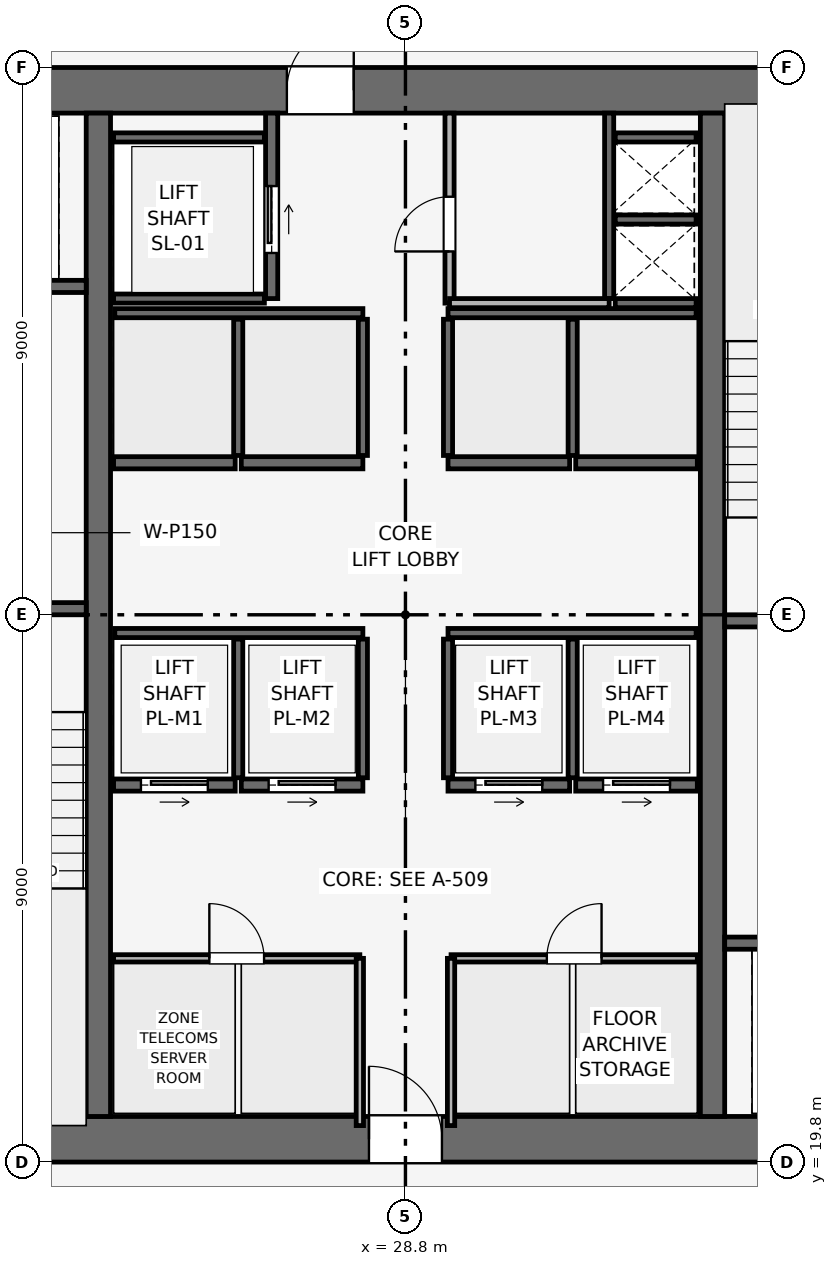
"""IFC4 building model, lengths in metres.
Left out: names, types, materials, properties, quantities, classifications, styles, units other than length and angle.
Written with IfcOpenShell. Run it as: python <this file> out.ifc"""

import sys

from ifc_helpers import new_model, si_unit, direction, frame, frame_2d, origin, place, context, subcontext, project, spatial, rectangle, extrude, element, fill, save


model = new_model("IFC4")
c1 = context("Model", 3, precision=1e-05, world=origin(), true_north=direction((0.0, 1.0)))
c2 = subcontext(c1, "Body", "Model", "MODEL_VIEW")
j1 = project(units=[si_unit("LENGTHUNIT", "METRE"), si_unit("PLANEANGLEUNIT", "RADIAN")], contexts=[c1])
p1 = place(None, origin())
s1 = spatial("IfcSite", under=j1, at=p1, CompositionType="ELEMENT")
p2 = place(p1, origin())
s2 = spatial("IfcBuilding", under=s1, at=p2, CompositionType="ELEMENT")
p3 = place(p2, frame((0.0, 0.0, 214.95)))
s3 = spatial("IfcBuildingStorey", under=s2, at=p3, CompositionType="ELEMENT", Elevation=214.95)
p4 = place(p3, frame((19.8, 20.175, 0.0), z_axis=(0.0, 0.0, 1.0), x_axis=(1.0, 0.0, 0.0)))
e1 = element("IfcWall", 1, at=p4, inside=s3, PredefinedType="SHEAR", context=c2, shape_type="SweptSolid", body=[
    extrude(rectangle(XDim=18.0, YDim=0.75, at=frame_2d((9.0, 0.0))), origin(), (0.0, 0.0, 1.0), 3.75),
])
p5 = place(p4, frame((8.4, 0.0, 0.0)))
e2 = element("IfcOpeningElement", 2, at=p5, cuts=e1, PredefinedType="OPENING", context=c2, shape_type="SweptSolid", body=[
    extrude(rectangle(XDim=1.2, YDim=2.2, at=frame_2d((0.6, 1.1))), frame((0.0, 0.385, 0.0), z_axis=(0.0, -1.0, 0.0), x_axis=(1.0, 0.0, 0.0)), (0.0, 0.0, 1.0), 0.77),
])
p6 = place(p3, frame((19.8, 37.425, 0.0), z_axis=(0.0, 0.0, 1.0), x_axis=(1.0, 0.0, 0.0)))
e3 = element("IfcWall", 3, at=p6, inside=s3, PredefinedType="SHEAR", context=c2, shape_type="SweptSolid", body=[
    extrude(rectangle(XDim=18.0, YDim=0.75, at=frame_2d((9.0, 0.0))), origin(), (0.0, 0.0, 1.0), 3.75),
])
p7 = place(p6, frame((7.05, 0.0, 0.0)))
e4 = element("IfcOpeningElement", 4, at=p7, cuts=e3, PredefinedType="OPENING", context=c2, shape_type="SweptSolid", body=[
    extrude(rectangle(XDim=1.1, YDim=2.15, at=frame_2d((0.55, 1.075))), frame((0.0, 0.385, 0.0), z_axis=(0.0, -1.0, 0.0), x_axis=(1.0, 0.0, 0.0)), (0.0, 0.0, 1.0), 0.77),
])
for number, where, z_axis, x_axis in (
    (5, (23.75, 20.55, 0.0), (0.0, 0.0, 1.0), (0.0, 1.0, 0.0)),
    (6, (33.85, 20.55, 0.0), (0.0, 0.0, 1.0), (0.0, 1.0, 0.0)),
):
    element("IfcWall", number, at=place(p3, frame(where, z_axis=z_axis, x_axis=x_axis)), inside=s3, PredefinedType="SHEAR", context=c2, shape_type="SweptSolid", body=[
        extrude(rectangle(XDim=16.5, YDim=0.4, at=frame_2d((8.25, 0.0))), origin(), (0.0, 0.0, 1.0), 3.75),
    ])
p8 = place(p3, frame((20.4, 28.9, 0.0), z_axis=(0.0, 0.0, 1.0), x_axis=(1.0, 0.0, 0.0)))
e7 = element("IfcWall", 7, at=p8, inside=s3, PredefinedType="SHEAR", context=c2, shape_type="SweptSolid", body=[
    extrude(rectangle(XDim=3.15, YDim=0.2, at=frame_2d((1.575, 0.0))), origin(), (0.0, 0.0, 1.0), 3.5),
])
p9 = place(p8, frame((0.8, 0.0, 0.0)))
e8 = element("IfcOpeningElement", 8, at=p9, cuts=e7, PredefinedType="OPENING", context=c2, shape_type="SweptSolid", body=[
    extrude(rectangle(XDim=1.0, YDim=2.1, at=frame_2d((0.5, 1.05))), frame((0.0, 0.11, 0.0), z_axis=(0.0, -1.0, 0.0), x_axis=(1.0, 0.0, 0.0)), (0.0, 0.0, 1.0), 0.22),
])
p10 = place(p3, frame((34.05, 28.7, 0.0), z_axis=(0.0, 0.0, 1.0), x_axis=(1.0, 0.0, 0.0)))
e9 = element("IfcWall", 9, at=p10, inside=s3, PredefinedType="SHEAR", context=c2, shape_type="SweptSolid", body=[
    extrude(rectangle(XDim=3.15, YDim=0.2, at=frame_2d((1.575, 0.0))), origin(), (0.0, 0.0, 1.0), 3.5),
])
p11 = place(p10, frame((0.8, 0.0, 0.0)))
e10 = element("IfcOpeningElement", 10, at=p11, cuts=e9, PredefinedType="OPENING", context=c2, shape_type="SweptSolid", body=[
    extrude(rectangle(XDim=1.0, YDim=2.1, at=frame_2d((0.5, 1.05))), frame((0.0, 0.11, 0.0), z_axis=(0.0, -1.0, 0.0), x_axis=(1.0, 0.0, 0.0)), (0.0, 0.0, 1.0), 0.22),
])
p12 = place(p3, frame((32.15, 34.0, 0.0), z_axis=(0.0, 0.0, 1.0), x_axis=(0.0, 1.0, 0.0)))
e11 = element("IfcWall", 11, at=p12, inside=s3, PredefinedType="SHEAR", context=c2, shape_type="SweptSolid", body=[
    extrude(rectangle(XDim=3.05, YDim=0.15, at=frame_2d((1.525, 0.0))), origin(), (0.0, 0.0, 1.0), 3.5),
])
for number, where, z_axis, x_axis in (
    (12, (32.25, 33.925, 0.0), (0.0, 0.0, 1.0), (1.0, 0.0, 0.0)),
    (13, (32.25, 35.3, 0.0), (0.0, 0.0, 1.0), (1.0, 0.0, 0.0)),
):
    element("IfcWall", number, at=place(p3, frame(where, z_axis=z_axis, x_axis=x_axis)), inside=s3, PredefinedType="SHEAR", context=c2, shape_type="SweptSolid", body=[
        extrude(rectangle(XDim=1.33, YDim=0.15, at=frame_2d((0.665, 0.0))), origin(), (0.0, 0.0, 1.0), 3.5),
    ])
p13 = place(p3, frame((20.5, 34.2, 0.0), z_axis=(0.0, 0.0, 1.0), x_axis=(1.0, 0.0, 0.0)))
e14 = element("IfcWall", 14, at=p13, inside=s3, PredefinedType="SHEAR", context=c2, shape_type="SweptSolid", body=[
    extrude(rectangle(XDim=3.05, YDim=0.2, at=frame_2d((1.525, 0.0))), origin(), (0.0, 0.0, 1.0), 3.5),
])
p14 = place(p13, frame((0.75, 0.0, 0.0)))
e15 = element("IfcOpeningElement", 15, at=p14, cuts=e14, PredefinedType="OPENING", context=c2, shape_type="SweptSolid", body=[
    extrude(rectangle(XDim=1.1, YDim=2.15, at=frame_2d((0.55, 1.075))), frame((0.0, 0.11, 0.0), z_axis=(0.0, -1.0, 0.0), x_axis=(1.0, 0.0, 0.0)), (0.0, 0.0, 1.0), 0.22),
])
p15 = place(p3, frame((34.05, 23.4, 0.0), z_axis=(0.0, 0.0, 1.0), x_axis=(1.0, 0.0, 0.0)))
e16 = element("IfcWall", 16, at=p15, inside=s3, PredefinedType="SHEAR", context=c2, shape_type="SweptSolid", body=[
    extrude(rectangle(XDim=3.05, YDim=0.2, at=frame_2d((1.525, 0.0))), origin(), (0.0, 0.0, 1.0), 3.5),
])
p16 = place(p15, frame((1.2, 0.0, 0.0)))
e17 = element("IfcOpeningElement", 17, at=p16, cuts=e16, PredefinedType="OPENING", context=c2, shape_type="SweptSolid", body=[
    extrude(rectangle(XDim=1.1, YDim=2.15, at=frame_2d((0.55, 1.075))), frame((0.0, 0.11, 0.0), z_axis=(0.0, -1.0, 0.0), x_axis=(1.0, 0.0, 0.0)), (0.0, 0.0, 1.0), 0.22),
])
p17 = place(p3, frame((26.6, 34.0, 0.0), z_axis=(0.0, 0.0, 1.0), x_axis=(0.0, 1.0, 0.0)))
e18 = element("IfcWall", 18, at=p17, inside=s3, PredefinedType="SHEAR", context=c2, shape_type="SweptSolid", body=[
    extrude(rectangle(XDim=3.05, YDim=0.2, at=frame_2d((1.525, 0.0))), origin(), (0.0, 0.0, 1.0), 3.5),
])
p18 = place(p17, frame((0.75, 0.0, 0.0)))
e19 = element("IfcOpeningElement", 19, at=p18, cuts=e18, PredefinedType="OPENING", context=c2, shape_type="SweptSolid", body=[
    extrude(rectangle(XDim=1.1, YDim=2.15, at=frame_2d((0.55, 1.075))), frame((0.0, 0.11, 0.0), z_axis=(0.0, -1.0, 0.0), x_axis=(1.0, 0.0, 0.0)), (0.0, 0.0, 1.0), 0.22),
])
for number, where, z_axis, x_axis in (
    (20, (24.0, 34.0, 0.0), (0.0, 0.0, 1.0), (1.0, 0.0, 0.0)),
    (21, (24.0, 36.65, 0.0), (0.0, 0.0, 1.0), (1.0, 0.0, 0.0)),
):
    element("IfcWall", number, at=place(p3, frame(where, z_axis=z_axis, x_axis=x_axis)), inside=s3, PredefinedType="SHEAR", context=c2, shape_type="SweptSolid", body=[
        extrude(rectangle(XDim=2.48, YDim=0.15, at=frame_2d((1.24, 0.0))), origin(), (0.0, 0.0, 1.0), 3.5),
    ])
p19 = place(p3, frame((24.0, 26.0, 0.0), z_axis=(0.0, 0.0, 1.0), x_axis=(1.0, 0.0, 0.0)))
e22 = element("IfcWall", 22, at=p19, inside=s3, PredefinedType="SHEAR", context=c2, shape_type="SweptSolid", body=[
    extrude(rectangle(XDim=2.0, YDim=0.2, at=frame_2d((1.0, 0.0))), origin(), (0.0, 0.0, 1.0), 3.5),
])
p20 = place(p19, frame((0.45, 0.0, 0.0)))
e23 = element("IfcOpeningElement", 23, at=p20, cuts=e22, PredefinedType="OPENING", context=c2, shape_type="SweptSolid", body=[
    extrude(rectangle(XDim=1.1, YDim=2.15, at=frame_2d((0.55, 1.075))), frame((0.0, 0.11, 0.0), z_axis=(0.0, -1.0, 0.0), x_axis=(1.0, 0.0, 0.0)), (0.0, 0.0, 1.0), 0.22),
])
p21 = place(p3, frame((26.1, 26.0, 0.0), z_axis=(0.0, 0.0, 1.0), x_axis=(1.0, 0.0, 0.0)))
e24 = element("IfcWall", 24, at=p21, inside=s3, PredefinedType="SHEAR", context=c2, shape_type="SweptSolid", body=[
    extrude(rectangle(XDim=2.0, YDim=0.2, at=frame_2d((1.0, 0.0))), origin(), (0.0, 0.0, 1.0), 3.5),
])
p22 = place(p21, frame((0.45, 0.0, 0.0)))
e25 = element("IfcOpeningElement", 25, at=p22, cuts=e24, PredefinedType="OPENING", context=c2, shape_type="SweptSolid", body=[
    extrude(rectangle(XDim=1.1, YDim=2.15, at=frame_2d((0.55, 1.075))), frame((0.0, 0.11, 0.0), z_axis=(0.0, -1.0, 0.0), x_axis=(1.0, 0.0, 0.0)), (0.0, 0.0, 1.0), 0.22),
])
p23 = place(p3, frame((29.5, 26.0, 0.0), z_axis=(0.0, 0.0, 1.0), x_axis=(1.0, 0.0, 0.0)))
e26 = element("IfcWall", 26, at=p23, inside=s3, PredefinedType="SHEAR", context=c2, shape_type="SweptSolid", body=[
    extrude(rectangle(XDim=2.0, YDim=0.2, at=frame_2d((1.0, 0.0))), origin(), (0.0, 0.0, 1.0), 3.5),
])
p24 = place(p23, frame((0.45, 0.0, 0.0)))
e27 = element("IfcOpeningElement", 27, at=p24, cuts=e26, PredefinedType="OPENING", context=c2, shape_type="SweptSolid", body=[
    extrude(rectangle(XDim=1.1, YDim=2.15, at=frame_2d((0.55, 1.075))), frame((0.0, 0.11, 0.0), z_axis=(0.0, -1.0, 0.0), x_axis=(1.0, 0.0, 0.0)), (0.0, 0.0, 1.0), 0.22),
])
p25 = place(p3, frame((31.6, 26.0, 0.0), z_axis=(0.0, 0.0, 1.0), x_axis=(1.0, 0.0, 0.0)))
e28 = element("IfcWall", 28, at=p25, inside=s3, PredefinedType="SHEAR", context=c2, shape_type="SweptSolid", body=[
    extrude(rectangle(XDim=2.0, YDim=0.2, at=frame_2d((1.0, 0.0))), origin(), (0.0, 0.0, 1.0), 3.5),
])
p26 = place(p25, frame((0.45, 0.0, 0.0)))
e29 = element("IfcOpeningElement", 29, at=p26, cuts=e28, PredefinedType="OPENING", context=c2, shape_type="SweptSolid", body=[
    extrude(rectangle(XDim=1.1, YDim=2.15, at=frame_2d((0.55, 1.075))), frame((0.0, 0.11, 0.0), z_axis=(0.0, -1.0, 0.0), x_axis=(1.0, 0.0, 0.0)), (0.0, 0.0, 1.0), 0.22),
])
for number, where, z_axis, x_axis in (
    (30, (24.0, 31.3, 0.0), (0.0, 0.0, 1.0), (1.0, 0.0, 0.0)),
    (31, (26.1, 31.3, 0.0), (0.0, 0.0, 1.0), (1.0, 0.0, 0.0)),
    (32, (29.5, 31.3, 0.0), (0.0, 0.0, 1.0), (1.0, 0.0, 0.0)),
    (33, (31.6, 31.3, 0.0), (0.0, 0.0, 1.0), (1.0, 0.0, 0.0)),
):
    element("IfcWall", number, at=place(p3, frame(where, z_axis=z_axis, x_axis=x_axis)), inside=s3, PredefinedType="SHEAR", context=c2, shape_type="SweptSolid", body=[
        extrude(rectangle(XDim=2.0, YDim=0.2, at=frame_2d((1.0, 0.0))), origin(), (0.0, 0.0, 1.0), 3.5),
    ])
p27 = place(p3, frame((32.25, 36.65, 0.0), z_axis=(0.0, 0.0, 1.0), x_axis=(1.0, 0.0, 0.0)))
e34 = element("IfcWall", 34, at=p27, inside=s3, PredefinedType="SHEAR", context=c2, shape_type="SweptSolid", body=[
    extrude(rectangle(XDim=1.33, YDim=0.15, at=frame_2d((0.665, 0.0))), origin(), (0.0, 0.0, 1.0), 3.5),
])
for number, where, z_axis, x_axis in (
    (35, (24.02, 28.5, 0.0), (0.0, 0.0, 1.0), (1.0, 0.0, 0.0)),
    (36, (29.5, 28.5, 0.0), (0.0, 0.0, 1.0), (1.0, 0.0, 0.0)),
):
    element("IfcWall", number, at=place(p3, frame(where, z_axis=z_axis, x_axis=x_axis)), inside=s3, PredefinedType="SHEAR", context=c2, shape_type="SweptSolid", body=[
        extrude(rectangle(XDim=4.08, YDim=0.15, at=frame_2d((2.04, 0.0))), origin(), (0.0, 0.0, 1.0), 3.5),
    ])
for number, where, z_axis, x_axis in (
    (37, (26.05, 26.12, 0.0), (0.0, 0.0, 1.0), (0.0, 1.0, 0.0)),
    (38, (28.1, 26.12, 0.0), (0.0, 0.0, 1.0), (0.0, 1.0, 0.0)),
    (39, (29.5, 26.12, 0.0), (0.0, 0.0, 1.0), (0.0, 1.0, 0.0)),
    (40, (31.55, 26.12, 0.0), (0.0, 0.0, 1.0), (0.0, 1.0, 0.0)),
):
    element("IfcWall", number, at=place(p3, frame(where, z_axis=z_axis, x_axis=x_axis)), inside=s3, PredefinedType="SHEAR", context=c2, shape_type="SweptSolid", body=[
        extrude(rectangle(XDim=2.28, YDim=0.15, at=frame_2d((1.14, 0.0))), origin(), (0.0, 0.0, 1.0), 3.5),
    ])
for number, where, z_axis, x_axis in (
    (41, (24.02, 33.76, 0.0), (0.0, 0.0, 1.0), (1.0, 0.0, 0.0)),
    (42, (29.5, 33.76, 0.0), (0.0, 0.0, 1.0), (1.0, 0.0, 0.0)),
):
    element("IfcWall", number, at=place(p3, frame(where, z_axis=z_axis, x_axis=x_axis)), inside=s3, PredefinedType="SHEAR", context=c2, shape_type="SweptSolid", body=[
        extrude(rectangle(XDim=4.08, YDim=0.15, at=frame_2d((2.04, 0.0))), origin(), (0.0, 0.0, 1.0), 3.5),
    ])
for number, where, z_axis, x_axis in (
    (43, (26.05, 31.42, 0.0), (0.0, 0.0, 1.0), (0.0, 1.0, 0.0)),
    (44, (28.1, 31.42, 0.0), (0.0, 0.0, 1.0), (0.0, 1.0, 0.0)),
    (45, (29.5, 31.42, 0.0), (0.0, 0.0, 1.0), (0.0, 1.0, 0.0)),
    (46, (31.55, 31.42, 0.0), (0.0, 0.0, 1.0), (0.0, 1.0, 0.0)),
):
    element("IfcWall", number, at=place(p3, frame(where, z_axis=z_axis, x_axis=x_axis)), inside=s3, PredefinedType="SHEAR", context=c2, shape_type="SweptSolid", body=[
        extrude(rectangle(XDim=2.24, YDim=0.15, at=frame_2d((1.12, 0.0))), origin(), (0.0, 0.0, 1.0), 3.5),
    ])
p28 = place(p3, frame((29.525, 33.925, 0.0), z_axis=(0.0, 0.0, 1.0), x_axis=(0.0, 1.0, 0.0)))
e47 = element("IfcWall", 47, at=p28, inside=s3, PredefinedType="PARTITIONING", context=c2, shape_type="SweptSolid", body=[
    extrude(rectangle(XDim=3.125, YDim=0.15, at=frame_2d((1.562, 0.0))), origin(), (0.0, 0.0, 1.0), 3.5),
])
p29 = place(p28, frame((0.85, 0.0, 0.0)))
e48 = element("IfcOpeningElement", 48, at=p29, cuts=e47, PredefinedType="OPENING", context=c2, shape_type="SweptSolid", body=[
    extrude(rectangle(XDim=0.9, YDim=2.1, at=frame_2d((0.45, 1.05))), frame((0.0, 0.085, 0.0), z_axis=(0.0, -1.0, 0.0), x_axis=(1.0, 0.0, 0.0)), (0.0, 0.0, 1.0), 0.17),
])
p30 = place(p3, frame((29.525, 33.925, 0.0), z_axis=(0.0, 0.0, 1.0), x_axis=(1.0, 0.0, 0.0)))
e49 = element("IfcWall", 49, at=p30, inside=s3, PredefinedType="PARTITIONING", context=c2, shape_type="SweptSolid", body=[
    extrude(rectangle(XDim=2.625, YDim=0.15, at=frame_2d((1.312, 0.0))), origin(), (0.0, 0.0, 1.0), 3.5),
])
p31 = place(p3, frame((24.0, 23.15, 0.0), z_axis=(0.0, 0.0, 1.0), x_axis=(1.0, 0.0, 0.0)))
e50 = element("IfcWall", 50, at=p31, inside=s3, PredefinedType="PARTITIONING", context=c2, shape_type="SweptSolid", body=[
    extrude(rectangle(XDim=4.05, YDim=0.12, at=frame_2d((2.025, 0.0))), origin(), (0.0, 0.0, 1.0), 3.5),
])
p32 = place(p31, frame((1.575, 0.0, 0.0)))
e51 = element("IfcOpeningElement", 51, at=p32, cuts=e50, PredefinedType="OPENING", context=c2, shape_type="SweptSolid", body=[
    extrude(rectangle(XDim=0.9, YDim=2.1, at=frame_2d((0.45, 1.05))), frame((0.0, 0.07, 0.0), z_axis=(0.0, -1.0, 0.0), x_axis=(1.0, 0.0, 0.0)), (0.0, 0.0, 1.0), 0.14),
])
p33 = place(p3, frame((28.05, 20.4, 0.0), z_axis=(0.0, 0.0, 1.0), x_axis=(0.0, 1.0, 0.0)))
e52 = element("IfcWall", 52, at=p33, inside=s3, PredefinedType="PARTITIONING", context=c2, shape_type="SweptSolid", body=[
    extrude(rectangle(XDim=2.75, YDim=0.12, at=frame_2d((1.375, 0.0))), origin(), (0.0, 0.0, 1.0), 3.5),
])
p34 = place(p3, frame((29.55, 23.15, 0.0), z_axis=(0.0, 0.0, 1.0), x_axis=(1.0, 0.0, 0.0)))
e53 = element("IfcWall", 53, at=p34, inside=s3, PredefinedType="PARTITIONING", context=c2, shape_type="SweptSolid", body=[
    extrude(rectangle(XDim=4.05, YDim=0.12, at=frame_2d((2.025, 0.0))), origin(), (0.0, 0.0, 1.0), 3.5),
])
p35 = place(p34, frame((1.575, 0.0, 0.0)))
e54 = element("IfcOpeningElement", 54, at=p35, cuts=e53, PredefinedType="OPENING", context=c2, shape_type="SweptSolid", body=[
    extrude(rectangle(XDim=0.9, YDim=2.1, at=frame_2d((0.45, 1.05))), frame((0.0, 0.07, 0.0), z_axis=(0.0, -1.0, 0.0), x_axis=(1.0, 0.0, 0.0)), (0.0, 0.0, 1.0), 0.14),
])
p36 = place(p3, frame((29.55, 20.4, 0.0), z_axis=(0.0, 0.0, 1.0), x_axis=(0.0, 1.0, 0.0)))
e55 = element("IfcWall", 55, at=p36, inside=s3, PredefinedType="PARTITIONING", context=c2, shape_type="SweptSolid", body=[
    extrude(rectangle(XDim=2.75, YDim=0.12, at=frame_2d((1.375, 0.0))), origin(), (0.0, 0.0, 1.0), 3.5),
])
p37 = place(p18, origin())
e56 = element("IfcDoor", 56, at=p37, inside=s3, OperationType="SLIDING_TO_RIGHT", PredefinedType="DOOR", context=c2, shape_type="SweptSolid", body=[
    extrude(rectangle(XDim=1.1, YDim=2.15, at=frame_2d((0.55, 1.075))), frame((0.0, 0.025, 0.0), z_axis=(0.0, -1.0, 0.0), x_axis=(1.0, 0.0, 0.0)), (0.0, 0.0, 1.0), 0.05),
])
fill(e19, e56)
p38 = place(p20, origin())
e57 = element("IfcDoor", 57, at=p38, inside=s3, OperationType="SLIDING_TO_RIGHT", PredefinedType="DOOR", context=c2, shape_type="SweptSolid", body=[
    extrude(rectangle(XDim=1.1, YDim=2.15, at=frame_2d((0.55, 1.075))), frame((0.0, 0.025, 0.0), z_axis=(0.0, -1.0, 0.0), x_axis=(1.0, 0.0, 0.0)), (0.0, 0.0, 1.0), 0.05),
])
fill(e23, e57)
p39 = place(p22, origin())
e58 = element("IfcDoor", 58, at=p39, inside=s3, OperationType="SLIDING_TO_RIGHT", PredefinedType="DOOR", context=c2, shape_type="SweptSolid", body=[
    extrude(rectangle(XDim=1.1, YDim=2.15, at=frame_2d((0.55, 1.075))), frame((0.0, 0.025, 0.0), z_axis=(0.0, -1.0, 0.0), x_axis=(1.0, 0.0, 0.0)), (0.0, 0.0, 1.0), 0.05),
])
fill(e25, e58)
p40 = place(p24, origin())
e59 = element("IfcDoor", 59, at=p40, inside=s3, OperationType="SLIDING_TO_RIGHT", PredefinedType="DOOR", context=c2, shape_type="SweptSolid", body=[
    extrude(rectangle(XDim=1.1, YDim=2.15, at=frame_2d((0.55, 1.075))), frame((0.0, 0.025, 0.0), z_axis=(0.0, -1.0, 0.0), x_axis=(1.0, 0.0, 0.0)), (0.0, 0.0, 1.0), 0.05),
])
fill(e27, e59)
p41 = place(p26, origin())
e60 = element("IfcDoor", 60, at=p41, inside=s3, OperationType="SLIDING_TO_RIGHT", PredefinedType="DOOR", context=c2, shape_type="SweptSolid", body=[
    extrude(rectangle(XDim=1.1, YDim=2.15, at=frame_2d((0.55, 1.075))), frame((0.0, 0.025, 0.0), z_axis=(0.0, -1.0, 0.0), x_axis=(1.0, 0.0, 0.0)), (0.0, 0.0, 1.0), 0.05),
])
fill(e29, e60)
p42 = place(p29, origin())
e61 = element("IfcDoor", 61, at=p42, inside=s3, OperationType="SINGLE_SWING_LEFT", PredefinedType="DOOR", context=c2, shape_type="SweptSolid", body=[
    extrude(rectangle(XDim=0.9, YDim=2.1, at=frame_2d((0.45, 1.05))), frame((0.0, 0.025, 0.0), z_axis=(0.0, -1.0, 0.0), x_axis=(1.0, 0.0, 0.0)), (0.0, 0.0, 1.0), 0.05),
])
fill(e48, e61)
p43 = place(p32, origin())
e62 = element("IfcDoor", 62, at=p43, inside=s3, OperationType="SINGLE_SWING_LEFT", PredefinedType="DOOR", context=c2, shape_type="SweptSolid", body=[
    extrude(rectangle(XDim=0.9, YDim=2.1, at=frame_2d((0.45, 1.05))), frame((0.0, 0.025, 0.0), z_axis=(0.0, -1.0, 0.0), x_axis=(1.0, 0.0, 0.0)), (0.0, 0.0, 1.0), 0.05),
])
fill(e51, e62)
p44 = place(p35, origin())
e63 = element("IfcDoor", 63, at=p44, inside=s3, OperationType="SINGLE_SWING_RIGHT", PredefinedType="DOOR", context=c2, shape_type="SweptSolid", body=[
    extrude(rectangle(XDim=0.9, YDim=2.1, at=frame_2d((0.45, 1.05))), frame((0.0, 0.025, 0.0), z_axis=(0.0, -1.0, 0.0), x_axis=(1.0, 0.0, 0.0)), (0.0, 0.0, 1.0), 0.05),
])
fill(e54, e63)
p45 = place(p5, origin())
e64 = element("IfcDoor", 64, at=p45, inside=s3, OperationType="SINGLE_SWING_LEFT", PredefinedType="DOOR", context=c2, shape_type="SweptSolid", body=[
    extrude(rectangle(XDim=1.2, YDim=2.2, at=frame_2d((0.6, 1.1))), frame((0.0, 0.025, 0.0), z_axis=(0.0, -1.0, 0.0), x_axis=(1.0, 0.0, 0.0)), (0.0, 0.0, 1.0), 0.05),
])
fill(e2, e64)
p46 = place(p7, origin())
e65 = element("IfcDoor", 65, at=p46, inside=s3, OperationType="SINGLE_SWING_RIGHT", PredefinedType="DOOR", context=c2, shape_type="SweptSolid", body=[
    extrude(rectangle(XDim=1.1, YDim=2.15, at=frame_2d((0.55, 1.075))), frame((0.0, 0.025, 0.0), z_axis=(0.0, -1.0, 0.0), x_axis=(1.0, 0.0, 0.0)), (0.0, 0.0, 1.0), 0.05),
])
fill(e4, e65)
save(model, sys.argv[1])
